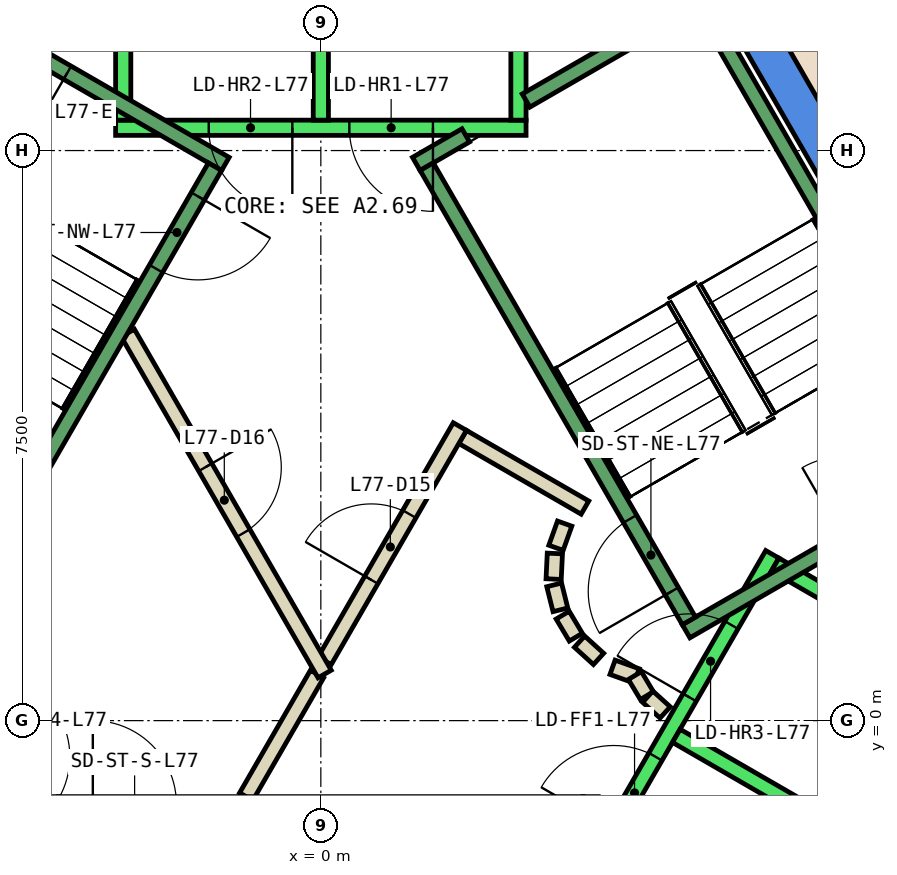
"""IFC4 building model, lengths in metres.
Left out: names, types, materials, properties, quantities, classifications, styles, units other than length and angle.
Written with IfcOpenShell. Run it as: python <this file> out.ifc"""

import sys

from ifc_helpers import new_model, si_unit, direction, frame, frame_2d, origin, place, context, subcontext, project, spatial, polyline, rectangle, outline, extrude, element, fill, save


model = new_model("IFC4")
c1 = context("Model", 3, precision=1e-05, world=origin(), true_north=direction((0.0, 1.0)))
c2 = subcontext(c1, "Body", "Model", "MODEL_VIEW")
j1 = project(units=[si_unit("LENGTHUNIT", "METRE"), si_unit("PLANEANGLEUNIT", "RADIAN")], contexts=[c1])
p1 = place(None, origin())
s1 = spatial("IfcSite", under=j1, at=p1, CompositionType="ELEMENT")
p2 = place(p1, origin())
s2 = spatial("IfcBuilding", under=s1, at=p2, CompositionType="ELEMENT")
p3 = place(p2, frame((0.0, 0.0, 326.0)))
s3 = spatial("IfcBuildingStorey", under=s2, at=p3, CompositionType="ELEMENT", Elevation=326.0)
p4 = place(p3, frame((0.0, 0.0, -0.6)))
e1 = element("IfcWall", 1, at=p4, inside=s3, PredefinedType="SHEAR", context=c2, shape_type="SweptSolid", body=[
    extrude(outline(polyline([(5.486, 9.998), (5.053, 9.748), (9.238, 2.5), (9.815, 2.5), (5.486, 9.998)])), origin(), (0.0, 0.0, 1.0), 5.55),
])
p5 = place(p3, frame((0.0, 0.0, -0.6)))
e2 = element("IfcWall", 2, at=p5, inside=s3, PredefinedType="SHEAR", context=c2, shape_type="SweptSolid", body=[
    extrude(outline(polyline([(4.907, -6.0), (9.815, 2.5), (9.238, 2.5), (4.619, -5.5), (4.907, -6.0)])), origin(), (0.0, 0.0, 1.0), 5.55),
])
p6 = place(p3, frame((-0.982, -1.0, 0.0), z_axis=(0.0, 0.0, 1.0), x_axis=(0.50024047865, 0.865886518847, 0.0)))
e3 = element("IfcWall", 3, at=p6, inside=s3, PredefinedType="PARTITIONING", context=c2, shape_type="SweptSolid", body=[
    extrude(rectangle(XDim=1.863, YDim=0.2, at=frame_2d((0.931, 0.0))), origin(), (0.0, 0.0, 1.0), 4.95),
])
p7 = place(p3, frame((1.866, 3.732, 0.0), z_axis=(0.0, 0.0, 1.0), x_axis=(0.866043361281, -0.499968895414, 0.0)))
e4 = element("IfcWall", 4, at=p7, inside=s3, PredefinedType="PARTITIONING", context=c2, shape_type="SweptSolid", body=[
    extrude(rectangle(XDim=1.858, YDim=0.2, at=frame_2d((0.929, 0.0))), origin(), (0.0, 0.0, 1.0), 4.95),
])
p8 = place(p3, frame((3.208, 2.592, 0.0), z_axis=(0.0, 0.0, 1.0), x_axis=(-0.337388820924, -0.941365382578, 0.0)))
e5 = element("IfcWall", 5, at=p8, inside=s3, PredefinedType="PARTITIONING", context=c2, shape_type="SweptSolid", body=[
    extrude(rectangle(XDim=0.338, YDim=0.2, at=frame_2d((0.169, 0.0))), origin(), (0.0, 0.0, 1.0), 4.95),
])
p9 = place(p3, frame((3.079, 2.199, 0.0), z_axis=(0.0, 0.0, 1.0), x_axis=(-0.047771483479, -0.998858290933, 0.0)))
e6 = element("IfcWall", 6, at=p9, inside=s3, PredefinedType="PARTITIONING", context=c2, shape_type="SweptSolid", body=[
    extrude(rectangle(XDim=0.337, YDim=0.2, at=frame_2d((0.169, 0.0))), origin(), (0.0, 0.0, 1.0), 4.95),
])
p10 = place(p3, frame((3.07, 1.786, 0.0), z_axis=(0.0, 0.0, 1.0), x_axis=(0.242705583207, -0.970099994784, 0.0)))
e7 = element("IfcWall", 7, at=p10, inside=s3, PredefinedType="PARTITIONING", context=c2, shape_type="SweptSolid", body=[
    extrude(rectangle(XDim=0.338, YDim=0.2, at=frame_2d((0.169, 0.0))), origin(), (0.0, 0.0, 1.0), 4.95),
])
for number, where, z_axis, x_axis in (
    (8, (3.182, 1.388, 0.0), (0.0, 0.0, 1.0), (0.512, -0.859, 0.0)),
    (9, (3.404, 1.039, 0.0), (0.0, 0.0, 1.0), (0.74, -0.672, 0.0)),
):
    element("IfcWall", number, at=place(p3, frame(where, z_axis=z_axis, x_axis=x_axis)), inside=s3, PredefinedType="PARTITIONING", context=c2, shape_type="SweptSolid", body=[
        extrude(rectangle(XDim=0.338, YDim=0.2, at=frame_2d((0.169, 0.0))), origin(), (0.0, 0.0, 1.0), 4.95),
    ])
p11 = place(p3, frame((3.838, 0.702, 0.0), z_axis=(0.0, 0.0, 1.0), x_axis=(0.941035081519, -0.338308993895, 0.0)))
e10 = element("IfcWall", 10, at=p11, inside=s3, PredefinedType="PARTITIONING", context=c2, shape_type="SweptSolid", body=[
    extrude(rectangle(XDim=0.337, YDim=0.2, at=frame_2d((0.168, 0.0))), origin(), (0.0, 0.0, 1.0), 4.95),
])
p12 = place(p3, frame((4.132, 0.593, 0.0), z_axis=(0.0, 0.0, 1.0), x_axis=(0.513561617048, -0.858052717201, 0.0)))
e11 = element("IfcWall", 11, at=p12, inside=s3, PredefinedType="PARTITIONING", context=c2, shape_type="SweptSolid", body=[
    extrude(rectangle(XDim=0.308, YDim=0.2, at=frame_2d((0.154, 0.0))), origin(), (0.0, 0.0, 1.0), 4.95),
])
p13 = place(p3, frame((4.301, 0.315, 0.0), z_axis=(0.0, 0.0, 1.0), x_axis=(0.741798017506, -0.670623367639, 0.0)))
e12 = element("IfcWall", 12, at=p13, inside=s3, PredefinedType="PARTITIONING", context=c2, shape_type="SweptSolid", body=[
    extrude(rectangle(XDim=0.309, YDim=0.2, at=frame_2d((0.154, 0.0))), origin(), (0.0, 0.0, 1.0), 4.95),
])
p14 = place(p3, frame((0.05, 0.787, 0.0), z_axis=(0.0, 0.0, 1.0), x_axis=(0.499954076797, 0.866051915934, 0.0)))
e13 = element("IfcWall", 13, at=p14, inside=s3, PredefinedType="PARTITIONING", context=c2, shape_type="SweptSolid", body=[
    extrude(rectangle(XDim=3.558, YDim=0.2, at=frame_2d((1.779, 0.0))), origin(), (0.0, 0.0, 1.0), 4.95),
])
p15 = place(p14, frame((1.229, 0.0, 0.0)))
e14 = element("IfcOpeningElement", 14, at=p15, cuts=e13, PredefinedType="OPENING", context=c2, shape_type="SweptSolid", body=[
    extrude(rectangle(XDim=1.0, YDim=2.1, at=frame_2d((0.5, 1.05))), frame((0.0, 0.11, 0.0), z_axis=(0.0, -1.0, 0.0), x_axis=(1.0, 0.0, 0.0)), (0.0, 0.0, 1.0), 0.22),
])
p16 = place(p3, frame((-2.54, 5.1, 0.0), z_axis=(0.0, 0.0, 1.0), x_axis=(0.499925051871, -0.866068670783, 0.0)))
e15 = element("IfcWall", 15, at=p16, inside=s3, PredefinedType="PARTITIONING", context=c2, shape_type="SweptSolid", body=[
    extrude(rectangle(XDim=5.181, YDim=0.2, at=frame_2d((2.59, 0.0))), origin(), (0.0, 0.0, 1.0), 4.95),
])
p17 = place(p16, frame((2.04, 0.0, 0.0)))
e16 = element("IfcOpeningElement", 16, at=p17, cuts=e15, PredefinedType="OPENING", context=c2, shape_type="SweptSolid", body=[
    extrude(rectangle(XDim=1.0, YDim=2.1, at=frame_2d((0.5, 1.05))), frame((0.0, 0.11, 0.0), z_axis=(0.0, -1.0, 0.0), x_axis=(1.0, 0.0, 0.0)), (0.0, 0.0, 1.0), 0.22),
])
p18 = place(p3, frame((5.532, 14.717, 0.0), z_axis=(0.0, 0.0, 1.0), x_axis=(0.499968011863, -0.866043871356, 0.0)))
e17 = element("IfcWall", 17, at=p18, inside=s3, PredefinedType="PARTITIONING", context=c2, shape_type="SweptSolid", body=[
    extrude(rectangle(XDim=7.201, YDim=0.2, at=frame_2d((3.6, 0.0))), origin(), (0.0, 0.0, 1.0), 4.95),
])
p19 = place(p18, frame((2.143, 0.0, 0.0)))
e18 = element("IfcOpeningElement", 18, at=p19, cuts=e17, PredefinedType="OPENING", context=c2, shape_type="SweptSolid", body=[
    extrude(rectangle(XDim=1.0, YDim=2.1, at=frame_2d((0.5, 1.05))), frame((0.0, 0.11, 0.0), z_axis=(0.0, -1.0, 0.0), x_axis=(1.0, 0.0, 0.0)), (0.0, 0.0, 1.0), 0.22),
])
p20 = place(p3, frame((2.7, 7.8, 0.0), z_axis=(0.0, 0.0, 1.0), x_axis=(-1.0, 0.0, 0.0)))
e19 = element("IfcWall", 19, at=p20, inside=s3, PredefinedType="STANDARD", context=c2, shape_type="SweptSolid", body=[
    extrude(rectangle(XDim=5.4, YDim=0.2, at=frame_2d((2.7, 0.0))), origin(), (0.0, 0.0, 1.0), 4.95),
])
p21 = place(p20, frame((1.225, 0.0, 0.0)))
e20 = element("IfcOpeningElement", 20, at=p21, cuts=e19, PredefinedType="OPENING", context=c2, shape_type="SweptSolid", body=[
    extrude(rectangle(XDim=1.1, YDim=2.1, at=frame_2d((0.55, 1.05))), frame((0.0, 0.11, 0.0), z_axis=(0.0, -1.0, 0.0), x_axis=(1.0, 0.0, 0.0)), (0.0, 0.0, 1.0), 0.22),
])
p22 = place(p20, frame((3.075, 0.0, 0.0)))
e21 = element("IfcOpeningElement", 21, at=p22, cuts=e19, PredefinedType="OPENING", context=c2, shape_type="SweptSolid", body=[
    extrude(rectangle(XDim=1.1, YDim=2.1, at=frame_2d((0.55, 1.05))), frame((0.0, 0.11, 0.0), z_axis=(0.0, -1.0, 0.0), x_axis=(1.0, 0.0, 0.0)), (0.0, 0.0, 1.0), 0.22),
])
for number, where, z_axis, x_axis in (
    (22, (2.6, 7.9, 0.0), (0.0, 0.0, 1.0), (0.0, 1.0, 0.0)),
    (23, (0.0, 7.9, 0.0), (0.0, 0.0, 1.0), (0.0, 1.0, 0.0)),
    (24, (-2.6, 7.9, 0.0), (0.0, 0.0, 1.0), (0.0, 1.0, 0.0)),
):
    element("IfcWall", number, at=place(p3, frame(where, z_axis=z_axis, x_axis=x_axis)), inside=s3, PredefinedType="STANDARD", context=c2, shape_type="SweptSolid", body=[
        extrude(rectangle(XDim=2.4, YDim=0.2, at=frame_2d((1.2, 0.0))), origin(), (0.0, 0.0, 1.0), 4.95),
    ])
p23 = place(p3, frame((-5.94, 2.188, 0.0), z_axis=(0.0, 0.0, 1.0), x_axis=(0.500034260056, -0.866005622828, 0.0)))
e25 = element("IfcWall", 25, at=p23, inside=s3, PredefinedType="STANDARD", context=c2, shape_type="SweptSolid", body=[
    extrude(rectangle(XDim=5.399, YDim=0.2, at=frame_2d((2.7, 0.0))), origin(), (0.0, 0.0, 1.0), 4.95),
])
p24 = place(p23, frame((3.075, 0.0, 0.0)))
e26 = element("IfcOpeningElement", 26, at=p24, cuts=e25, PredefinedType="OPENING", context=c2, shape_type="SweptSolid", body=[
    extrude(rectangle(XDim=1.1, YDim=2.1, at=frame_2d((0.55, 1.05))), frame((0.0, 0.11, 0.0), z_axis=(0.0, -1.0, 0.0), x_axis=(1.0, 0.0, 0.0)), (0.0, 0.0, 1.0), 0.22),
])
p25 = place(p23, frame((1.225, 0.0, 0.0)))
e27 = element("IfcOpeningElement", 27, at=p25, cuts=e25, PredefinedType="OPENING", context=c2, shape_type="SweptSolid", body=[
    extrude(rectangle(XDim=1.1, YDim=2.1, at=frame_2d((0.55, 1.05))), frame((0.0, 0.11, 0.0), z_axis=(0.0, -1.0, 0.0), x_axis=(1.0, 0.0, 0.0)), (0.0, 0.0, 1.0), 0.22),
])
p26 = place(p3, frame((3.24, -2.488, 0.0), z_axis=(0.0, 0.0, 1.0), x_axis=(0.500034260056, 0.866005622828, 0.0)))
e28 = element("IfcWall", 28, at=p26, inside=s3, PredefinedType="STANDARD", context=c2, shape_type="SweptSolid", body=[
    extrude(rectangle(XDim=5.399, YDim=0.2, at=frame_2d((2.7, 0.0))), origin(), (0.0, 0.0, 1.0), 4.95),
])
p27 = place(p26, frame((3.225, 0.0, 0.0)))
e29 = element("IfcOpeningElement", 29, at=p27, cuts=e28, PredefinedType="OPENING", context=c2, shape_type="SweptSolid", body=[
    extrude(rectangle(XDim=1.1, YDim=2.1, at=frame_2d((0.55, 1.05))), frame((0.0, 0.11, 0.0), z_axis=(0.0, -1.0, 0.0), x_axis=(1.0, 0.0, 0.0)), (0.0, 0.0, 1.0), 0.22),
])
p28 = place(p26, frame((1.225, 0.0, 0.0)))
e30 = element("IfcOpeningElement", 30, at=p28, cuts=e28, PredefinedType="OPENING", context=c2, shape_type="SweptSolid", body=[
    extrude(rectangle(XDim=1.1, YDim=2.1, at=frame_2d((0.55, 1.05))), frame((0.0, 0.11, 0.0), z_axis=(0.0, -1.0, 0.0), x_axis=(1.0, 0.0, 0.0)), (0.0, 0.0, 1.0), 0.22),
])
p29 = place(p3, frame((5.492, -3.788, 0.0), z_axis=(0.0, 0.0, 1.0), x_axis=(0.500034260056, 0.866005622828, 0.0)))
e31 = element("IfcWall", 31, at=p29, inside=s3, PredefinedType="STANDARD", context=c2, shape_type="SweptSolid", body=[
    extrude(rectangle(XDim=5.399, YDim=0.2, at=frame_2d((2.7, 0.0))), origin(), (0.0, 0.0, 1.0), 4.95),
])
for number, where, z_axis, x_axis in (
    (32, (4.677, -0.2, 0.0), (0.0, 0.0, 1.0), (0.866, -0.5, 0.0)),
    (33, (5.977, 2.052, 0.0), (0.0, 0.0, 1.0), (0.866, -0.5, 0.0)),
):
    element("IfcWall", number, at=place(p3, frame(where, z_axis=z_axis, x_axis=x_axis)), inside=s3, PredefinedType="STANDARD", context=c2, shape_type="SweptSolid", body=[
        extrude(rectangle(XDim=2.399, YDim=0.2, at=frame_2d((1.2, 0.0))), origin(), (0.0, 0.0, 1.0), 4.95),
    ])
p30 = place(p3, frame((4.806, 1.176, 0.0), z_axis=(0.0, 0.0, 1.0), x_axis=(0.866059941101, 0.499940174841, 0.0)))
e34 = element("IfcWall", 34, at=p30, inside=s3, PredefinedType="STANDARD", context=c2, shape_type="SweptSolid", body=[
    extrude(rectangle(XDim=4.4, YDim=0.2, at=frame_2d((2.2, 0.0))), origin(), (0.0, 0.0, 1.0), 4.95),
])
p31 = place(p30, frame((2.4, 0.0, 0.0)))
e35 = element("IfcOpeningElement", 35, at=p31, cuts=e34, PredefinedType="OPENING", context=c2, shape_type="SweptSolid", body=[
    extrude(rectangle(XDim=1.1, YDim=2.2, at=frame_2d((0.55, 1.1))), frame((0.0, 0.11, 0.0), z_axis=(0.0, -1.0, 0.0), x_axis=(1.0, 0.0, 0.0)), (0.0, 0.0, 1.0), 0.22),
])
p32 = place(p3, frame((2.7, 8.158, 0.0), z_axis=(0.0, 0.0, 1.0), x_axis=(0.86611865017, 0.499838457731, 0.0)))
e36 = element("IfcWall", 36, at=p32, inside=s3, PredefinedType="STANDARD", context=c2, shape_type="SweptSolid", body=[
    extrude(rectangle(XDim=2.733, YDim=0.2, at=frame_2d((1.366, 0.0))), origin(), (0.0, 0.0, 1.0), 4.95),
])
p33 = place(p3, frame((1.256, 7.324, 0.0), z_axis=(0.0, 0.0, 1.0), x_axis=(0.865915093549, 0.500191014278, 0.0)))
e37 = element("IfcWall", 37, at=p33, inside=s3, PredefinedType="STANDARD", context=c2, shape_type="SweptSolid", body=[
    extrude(rectangle(XDim=0.752, YDim=0.2, at=frame_2d((0.376, 0.0))), origin(), (0.0, 0.0, 1.0), 4.95),
])
p34 = place(p3, frame((4.843, 1.312, 0.0), z_axis=(0.0, 0.0, 1.0), x_axis=(-0.499963383562, 0.866046543262, 0.0)))
e38 = element("IfcWall", 38, at=p34, inside=s3, PredefinedType="STANDARD", context=c2, shape_type="SweptSolid", body=[
    extrude(rectangle(XDim=6.9, YDim=0.2, at=frame_2d((3.45, 0.0))), origin(), (0.0, 0.0, 1.0), 4.95),
])
p35 = place(p34, frame((0.45, 0.0, 0.0)))
e39 = element("IfcOpeningElement", 39, at=p35, cuts=e38, PredefinedType="OPENING", context=c2, shape_type="SweptSolid", body=[
    extrude(rectangle(XDim=1.1, YDim=2.2, at=frame_2d((0.55, 1.1))), frame((0.0, 0.11, 0.0), z_axis=(0.0, -1.0, 0.0), x_axis=(1.0, 0.0, 0.0)), (0.0, 0.0, 1.0), 0.22),
])
p36 = place(p3, frame((8.48, 3.412, 0.0), z_axis=(0.0, 0.0, 1.0), x_axis=(-0.499978703459, 0.866037698999, 0.0)))
e40 = element("IfcWall", 40, at=p36, inside=s3, PredefinedType="STANDARD", context=c2, shape_type="SweptSolid", body=[
    extrude(rectangle(XDim=6.9, YDim=0.2, at=frame_2d((3.45, 0.0))), origin(), (0.0, 0.0, 1.0), 4.95),
])
p37 = place(p3, frame((-1.256, 7.324, 0.0), z_axis=(0.0, 0.0, 1.0), x_axis=(-0.866046073146, 0.499964197906, 0.0)))
e41 = element("IfcWall", 41, at=p37, inside=s3, PredefinedType="STANDARD", context=c2, shape_type="SweptSolid", body=[
    extrude(rectangle(XDim=4.4, YDim=0.2, at=frame_2d((2.2, 0.0))), origin(), (0.0, 0.0, 1.0), 4.95),
])
p38 = place(p37, frame((2.4, 0.0, 0.0)))
e42 = element("IfcOpeningElement", 42, at=p38, cuts=e41, PredefinedType="OPENING", context=c2, shape_type="SweptSolid", body=[
    extrude(rectangle(XDim=1.1, YDim=2.2, at=frame_2d((0.55, 1.1))), frame((0.0, 0.11, 0.0), z_axis=(0.0, -1.0, 0.0), x_axis=(1.0, 0.0, 0.0)), (0.0, 0.0, 1.0), 0.22),
])
p39 = place(p3, frame((-1.393, 7.288, 0.0), z_axis=(0.0, 0.0, 1.0), x_axis=(-0.499963383562, -0.866046543262, 0.0)))
e43 = element("IfcWall", 43, at=p39, inside=s3, PredefinedType="STANDARD", context=c2, shape_type="SweptSolid", body=[
    extrude(rectangle(XDim=6.9, YDim=0.2, at=frame_2d((3.45, 0.0))), origin(), (0.0, 0.0, 1.0), 4.95),
])
p40 = place(p39, frame((0.45, 0.0, 0.0)))
e44 = element("IfcOpeningElement", 44, at=p40, cuts=e43, PredefinedType="OPENING", context=c2, shape_type="SweptSolid", body=[
    extrude(rectangle(XDim=1.1, YDim=2.2, at=frame_2d((0.55, 1.1))), frame((0.0, 0.11, 0.0), z_axis=(0.0, -1.0, 0.0), x_axis=(1.0, 0.0, 0.0)), (0.0, 0.0, 1.0), 0.22),
])
p41 = place(p15, origin())
e45 = element("IfcDoor", 45, at=p41, inside=s3, OperationType="SINGLE_SWING_RIGHT", PredefinedType="DOOR", context=c2, shape_type="SweptSolid", body=[
    extrude(rectangle(XDim=1.0, YDim=2.1, at=frame_2d((0.5, 1.05))), frame((0.0, 0.025, 0.0), z_axis=(0.0, -1.0, 0.0), x_axis=(1.0, 0.0, 0.0)), (0.0, 0.0, 1.0), 0.05),
])
fill(e14, e45)
p42 = place(p17, origin())
e46 = element("IfcDoor", 46, at=p42, inside=s3, OperationType="SINGLE_SWING_RIGHT", PredefinedType="DOOR", context=c2, shape_type="SweptSolid", body=[
    extrude(rectangle(XDim=1.0, YDim=2.1, at=frame_2d((0.5, 1.05))), frame((0.0, 0.025, 0.0), z_axis=(0.0, -1.0, 0.0), x_axis=(1.0, 0.0, 0.0)), (0.0, 0.0, 1.0), 0.05),
])
fill(e16, e46)
p43 = place(p21, origin())
e47 = element("IfcDoor", 47, at=p43, inside=s3, OperationType="SLIDING_TO_LEFT", PredefinedType="DOOR", context=c2, shape_type="SweptSolid", body=[
    extrude(rectangle(XDim=1.1, YDim=2.1, at=frame_2d((0.55, 1.05))), frame((0.0, 0.025, 0.0), z_axis=(0.0, -1.0, 0.0), x_axis=(1.0, 0.0, 0.0)), (0.0, 0.0, 1.0), 0.05),
])
fill(e20, e47)
p44 = place(p22, origin())
e48 = element("IfcDoor", 48, at=p44, inside=s3, OperationType="SLIDING_TO_LEFT", PredefinedType="DOOR", context=c2, shape_type="SweptSolid", body=[
    extrude(rectangle(XDim=1.1, YDim=2.1, at=frame_2d((0.55, 1.05))), frame((0.0, 0.025, 0.0), z_axis=(0.0, -1.0, 0.0), x_axis=(1.0, 0.0, 0.0)), (0.0, 0.0, 1.0), 0.05),
])
fill(e21, e48)
p45 = place(p27, origin())
e49 = element("IfcDoor", 49, at=p45, inside=s3, OperationType="SLIDING_TO_LEFT", PredefinedType="DOOR", context=c2, shape_type="SweptSolid", body=[
    extrude(rectangle(XDim=1.1, YDim=2.1, at=frame_2d((0.55, 1.05))), frame((0.0, 0.025, 0.0), z_axis=(0.0, -1.0, 0.0), x_axis=(1.0, 0.0, 0.0)), (0.0, 0.0, 1.0), 0.05),
])
fill(e29, e49)
p46 = place(p28, origin())
e50 = element("IfcDoor", 50, at=p46, inside=s3, OperationType="SLIDING_TO_LEFT", PredefinedType="DOOR", context=c2, shape_type="SweptSolid", body=[
    extrude(rectangle(XDim=1.1, YDim=2.1, at=frame_2d((0.55, 1.05))), frame((0.0, 0.025, 0.0), z_axis=(0.0, -1.0, 0.0), x_axis=(1.0, 0.0, 0.0)), (0.0, 0.0, 1.0), 0.05),
])
fill(e30, e50)
p47 = place(p35, origin())
e51 = element("IfcDoor", 51, at=p47, inside=s3, OperationType="SINGLE_SWING_LEFT", PredefinedType="DOOR", context=c2, shape_type="SweptSolid", body=[
    extrude(rectangle(XDim=1.1, YDim=2.2, at=frame_2d((0.55, 1.1))), frame((0.0, 0.025, 0.0), z_axis=(0.0, -1.0, 0.0), x_axis=(1.0, 0.0, 0.0)), (0.0, 0.0, 1.0), 0.05),
])
fill(e39, e51)
p48 = place(p40, origin())
e52 = element("IfcDoor", 52, at=p48, inside=s3, OperationType="SINGLE_SWING_LEFT", PredefinedType="DOOR", context=c2, shape_type="SweptSolid", body=[
    extrude(rectangle(XDim=1.1, YDim=2.2, at=frame_2d((0.55, 1.1))), frame((0.0, 0.025, 0.0), z_axis=(0.0, -1.0, 0.0), x_axis=(1.0, 0.0, 0.0)), (0.0, 0.0, 1.0), 0.05),
])
fill(e44, e52)
p49 = place(p38, origin())
e53 = element("IfcDoor", 53, at=p49, inside=s3, OperationType="SINGLE_SWING_LEFT", PredefinedType="DOOR", context=c2, shape_type="SweptSolid", body=[
    extrude(rectangle(XDim=1.1, YDim=2.2, at=frame_2d((0.55, 1.1))), frame((0.0, 0.025, 0.0), z_axis=(0.0, -1.0, 0.0), x_axis=(1.0, 0.0, 0.0)), (0.0, 0.0, 1.0), 0.05),
])
fill(e42, e53)
save(model, sys.argv[1])
